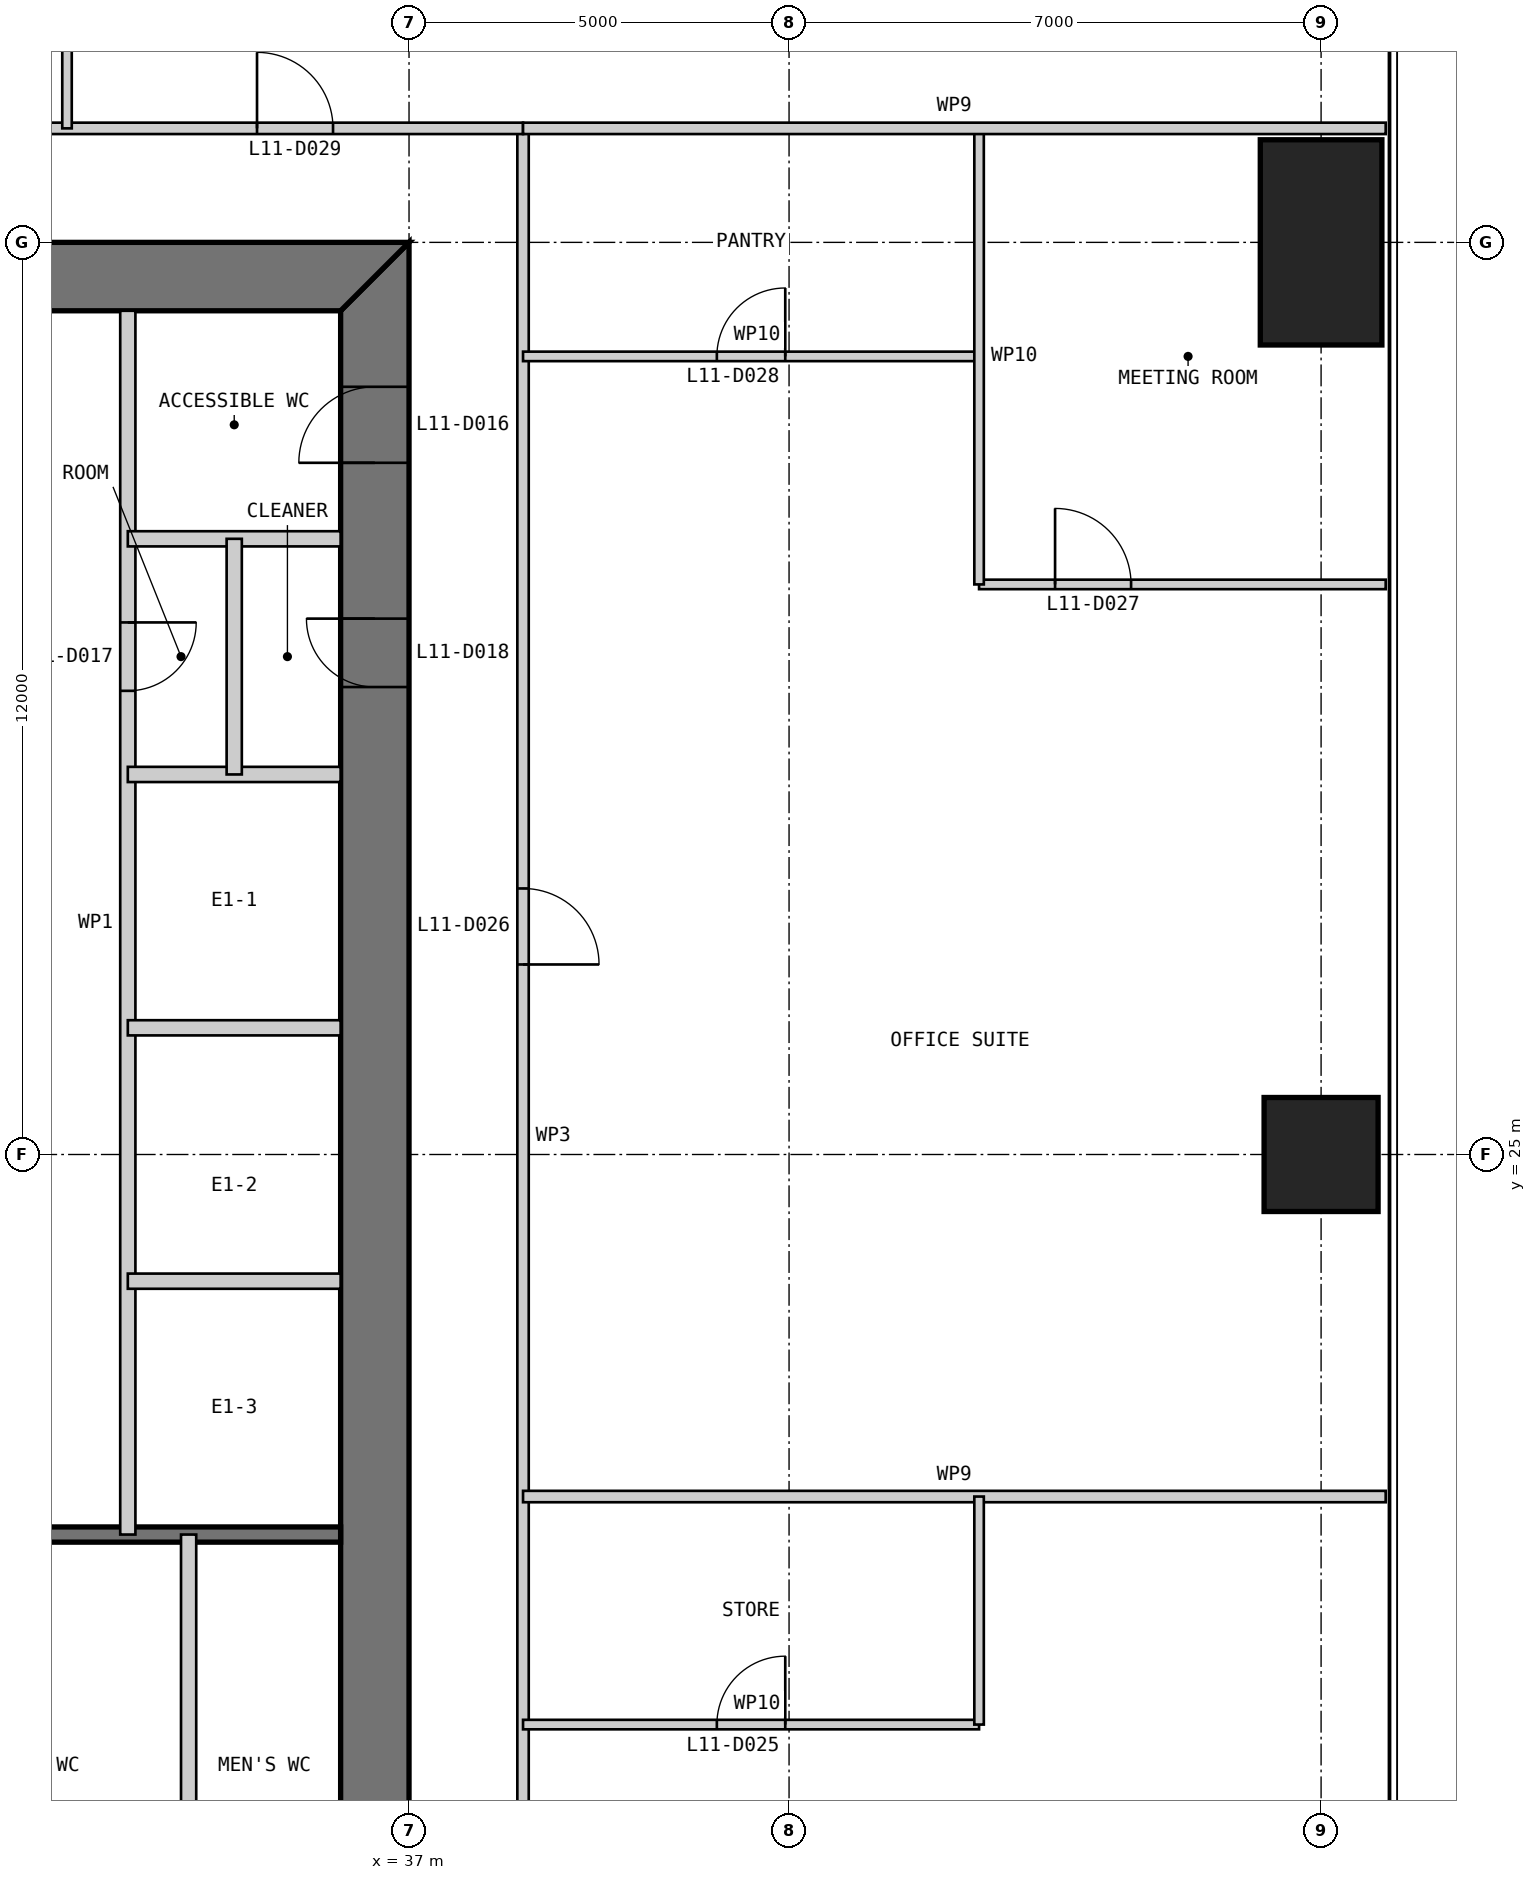
"""IFC4 building model, lengths in metres.
Left out: names, types, materials, properties, quantities, classifications, styles, units other than length and angle.
Written with IfcOpenShell. Run it as: python <this file> out.ifc"""

import sys

from ifc_helpers import new_model, si_unit, direction, frame, frame_2d, origin, origin_2d, place, context, subcontext, project, spatial, polyline, rectangle, outline, extrude, element, fill, save


model = new_model("IFC4")
c1 = context("Model", 3, precision=1e-05, world=origin(), true_north=direction((0.0, 1.0)))
c2 = subcontext(c1, "Body", "Model", "MODEL_VIEW")
j1 = project(units=[si_unit("LENGTHUNIT", "METRE"), si_unit("PLANEANGLEUNIT", "RADIAN")], contexts=[c1])
p1 = place(None, origin())
s1 = spatial("IfcSite", under=j1, at=p1, CompositionType="ELEMENT")
p2 = place(p1, origin())
s2 = spatial("IfcBuilding", under=s1, at=p2, CompositionType="ELEMENT")
p3 = place(p2, frame((0.0, 0.0, 51.0)))
s3 = spatial("IfcBuildingStorey", under=s2, at=p3, CompositionType="ELEMENT", Elevation=51.0)
p4 = place(p3, frame((49.0, 25.0, 0.0), z_axis=(0.0, 0.0, 1.0), x_axis=(1.0, 0.0, 0.0)))
e1 = element("IfcColumn", 1, at=p4, inside=s3, PredefinedType="COLUMN", context=c2, shape_type="SweptSolid", body=[
    extrude(rectangle(XDim=1.5, YDim=1.5, at=origin_2d()), origin(), (0.0, 0.0, 1.0), 4.0),
])
p5 = place(p3, frame((49.0, 37.0, 0.0), z_axis=(0.0, 0.0, 1.0), x_axis=(1.0, 0.0, 0.0)))
e2 = element("IfcColumn", 2, at=p5, inside=s3, PredefinedType="COLUMN", context=c2, shape_type="SweptSolid", body=[
    extrude(rectangle(XDim=1.6, YDim=2.7, at=origin_2d()), origin(), (0.0, 0.0, 1.0), 4.0),
])
p6 = place(p3, frame((36.55, 13.9, 0.0), z_axis=(0.0, 0.0, 1.0), x_axis=(0.0, 1.0, 0.0)))
e3 = element("IfcWall", 3, at=p6, inside=s3, PredefinedType="SHEAR", context=c2, shape_type="SweptSolid", body=[
    extrude(outline(polyline([(-0.9, -0.45), (23.1, -0.45), (22.2, 0.45), (0.0, 0.45), (-0.9, -0.45)])), origin(), (0.0, 0.0, 1.0), 4.0),
])
p7 = place(p6, frame((20.2, 0.0, 0.0)))
e4 = element("IfcOpeningElement", 4, at=p7, cuts=e3, PredefinedType="OPENING", context=c2, shape_type="SweptSolid", body=[
    extrude(rectangle(XDim=1.0, YDim=2.2, at=frame_2d((0.5, 1.1))), frame((0.0, 0.46, 0.0), z_axis=(0.0, -1.0, 0.0), x_axis=(1.0, 0.0, 0.0)), (0.0, 0.0, 1.0), 0.92),
])
p8 = place(p6, frame((17.25, 0.0, 0.0)))
e5 = element("IfcOpeningElement", 5, at=p8, cuts=e3, PredefinedType="OPENING", context=c2, shape_type="SweptSolid", body=[
    extrude(rectangle(XDim=0.9, YDim=2.2, at=frame_2d((0.45, 1.1))), frame((0.0, 0.46, 0.0), z_axis=(0.0, -1.0, 0.0), x_axis=(1.0, 0.0, 0.0)), (0.0, 0.0, 1.0), 0.92),
])
p9 = place(p3, frame((37.0, 36.55, 0.0), z_axis=(0.0, 0.0, 1.0), x_axis=(-1.0, 0.0, 0.0)))
e6 = element("IfcWall", 6, at=p9, inside=s3, PredefinedType="SHEAR", context=c2, shape_type="SweptSolid", body=[
    extrude(outline(polyline([(0.0, -0.45), (24.0, -0.45), (23.1, 0.45), (0.9, 0.45), (0.0, -0.45)])), origin(), (0.0, 0.0, 1.0), 4.0),
])
p10 = place(p9, frame((4.9, 0.0, 0.0)))
e7 = element("IfcOpeningElement", 7, at=p10, cuts=e6, PredefinedType="OPENING", context=c2, shape_type="SweptSolid", body=[
    extrude(rectangle(XDim=1.0, YDim=2.2, at=frame_2d((0.5, 1.1))), frame((0.0, 0.46, 0.0), z_axis=(0.0, -1.0, 0.0), x_axis=(1.0, 0.0, 0.0)), (0.0, 0.0, 1.0), 0.92),
])
p11 = place(p9, frame((8.9, 0.0, 0.0)))
e8 = element("IfcOpeningElement", 8, at=p11, cuts=e6, PredefinedType="OPENING", context=c2, shape_type="SweptSolid", body=[
    extrude(rectangle(XDim=1.1, YDim=2.2, at=frame_2d((0.55, 1.1))), frame((0.0, 0.46, 0.0), z_axis=(0.0, -1.0, 0.0), x_axis=(1.0, 0.0, 0.0)), (0.0, 0.0, 1.0), 0.92),
])
p12 = place(p9, frame((15.05, 0.0, 0.0)))
e9 = element("IfcOpeningElement", 9, at=p12, cuts=e6, PredefinedType="OPENING", context=c2, shape_type="SweptSolid", body=[
    extrude(rectangle(XDim=0.9, YDim=2.2, at=frame_2d((0.45, 1.1))), frame((0.0, 0.46, 0.0), z_axis=(0.0, -1.0, 0.0), x_axis=(1.0, 0.0, 0.0)), (0.0, 0.0, 1.0), 0.92),
])
p13 = place(p9, frame((17.9, 0.0, 0.0)))
e10 = element("IfcOpeningElement", 10, at=p13, cuts=e6, PredefinedType="OPENING", context=c2, shape_type="SweptSolid", body=[
    extrude(rectangle(XDim=1.0, YDim=2.2, at=frame_2d((0.5, 1.1))), frame((0.0, 0.46, 0.0), z_axis=(0.0, -1.0, 0.0), x_axis=(1.0, 0.0, 0.0)), (0.0, 0.0, 1.0), 0.92),
])
p14 = place(p9, frame((21.4, 0.0, 0.0)))
e11 = element("IfcOpeningElement", 11, at=p14, cuts=e6, PredefinedType="OPENING", context=c2, shape_type="SweptSolid", body=[
    extrude(rectangle(XDim=1.0, YDim=2.2, at=frame_2d((0.5, 1.1))), frame((0.0, 0.46, 0.0), z_axis=(0.0, -1.0, 0.0), x_axis=(1.0, 0.0, 0.0)), (0.0, 0.0, 1.0), 0.92),
])
p15 = place(p3, frame((20.3, 20.0, 0.0), z_axis=(0.0, 0.0, 1.0), x_axis=(1.0, 0.0, 0.0)))
e12 = element("IfcWall", 12, at=p15, inside=s3, PredefinedType="SOLIDWALL", context=c2, shape_type="SweptSolid", body=[
    extrude(rectangle(XDim=15.8, YDim=0.2, at=frame_2d((7.9, 0.0))), origin(), (0.0, 0.0, 1.0), 3.8),
])
p16 = place(p3, frame((34.1, 13.9, 0.0), z_axis=(0.0, 0.0, 1.0), x_axis=(0.0, 1.0, 0.0)))
e13 = element("IfcWall", 13, at=p16, inside=s3, PredefinedType="PARTITIONING", context=c2, shape_type="SweptSolid", body=[
    extrude(rectangle(XDim=6.1, YDim=0.2, at=frame_2d((3.05, 0.0))), origin(), (0.0, 0.0, 1.0), 3.8),
])
p17 = place(p3, frame((33.3, 36.1, 0.0), z_axis=(0.0, 0.0, 1.0), x_axis=(0.0, -1.0, 0.0)))
e14 = element("IfcWall", 14, at=p17, inside=s3, PredefinedType="PARTITIONING", context=c2, shape_type="SweptSolid", body=[
    extrude(rectangle(XDim=16.1, YDim=0.2, at=frame_2d((8.05, 0.0))), origin(), (0.0, 0.0, 1.0), 3.8),
])
p18 = place(p17, frame((4.1, 0.0, 0.0)))
e15 = element("IfcOpeningElement", 15, at=p18, cuts=e14, PredefinedType="OPENING", context=c2, shape_type="SweptSolid", body=[
    extrude(rectangle(XDim=0.9, YDim=2.2, at=frame_2d((0.45, 1.1))), frame((0.0, 0.11, 0.0), z_axis=(0.0, -1.0, 0.0), x_axis=(1.0, 0.0, 0.0)), (0.0, 0.0, 1.0), 0.22),
])
for number, where, z_axis, x_axis in (
    (16, (36.1, 30.0, 0.0), (0.0, 0.0, 1.0), (-1.0, 0.0, 0.0)),
    (17, (36.1, 26.667, 0.0), (0.0, 0.0, 1.0), (-1.0, 0.0, 0.0)),
    (18, (36.1, 23.333, 0.0), (0.0, 0.0, 1.0), (-1.0, 0.0, 0.0)),
    (19, (36.1, 33.1, 0.0), (0.0, 0.0, 1.0), (-1.0, 0.0, 0.0)),
):
    element("IfcWall", number, at=place(p3, frame(where, z_axis=z_axis, x_axis=x_axis)), inside=s3, PredefinedType="PARTITIONING", context=c2, shape_type="SweptSolid", body=[
        extrude(rectangle(XDim=2.8, YDim=0.2, at=frame_2d((1.4, 0.0))), origin(), (0.0, 0.0, 1.0), 3.8),
    ])
p19 = place(p3, frame((34.7, 33.1, 0.0), z_axis=(0.0, 0.0, 1.0), x_axis=(0.0, -1.0, 0.0)))
e20 = element("IfcWall", 20, at=p19, inside=s3, PredefinedType="PARTITIONING", context=c2, shape_type="SweptSolid", body=[
    extrude(rectangle(XDim=3.1, YDim=0.2, at=frame_2d((1.55, 0.0))), origin(), (0.0, 0.0, 1.0), 3.8),
])
p20 = place(p3, frame((38.5, 11.5, 0.0), z_axis=(0.0, 0.0, 1.0), x_axis=(0.0, 1.0, 0.0)))
e21 = element("IfcWall", 21, at=p20, inside=s3, PredefinedType="PARTITIONING", context=c2, shape_type="SweptSolid", body=[
    extrude(rectangle(XDim=27.0, YDim=0.15, at=frame_2d((13.5, 0.0))), origin(), (0.0, 0.0, 1.0), 3.85),
])
p21 = place(p20, frame((2.5, 0.0, 0.0)))
e22 = element("IfcOpeningElement", 22, at=p21, cuts=e21, PredefinedType="OPENING", context=c2, shape_type="SweptSolid", body=[
    extrude(rectangle(XDim=1.0, YDim=2.2, at=frame_2d((0.5, 1.1))), frame((0.0, 0.085, 0.0), z_axis=(0.0, -1.0, 0.0), x_axis=(1.0, 0.0, 0.0)), (0.0, 0.0, 1.0), 0.17),
])
p22 = place(p20, frame((16.0, 0.0, 0.0)))
e23 = element("IfcOpeningElement", 23, at=p22, cuts=e21, PredefinedType="OPENING", context=c2, shape_type="SweptSolid", body=[
    extrude(rectangle(XDim=1.0, YDim=2.2, at=frame_2d((0.5, 1.1))), frame((0.0, 0.085, 0.0), z_axis=(0.0, -1.0, 0.0), x_axis=(1.0, 0.0, 0.0)), (0.0, 0.0, 1.0), 0.17),
])
p23 = place(p3, frame((44.5, 17.5, 0.0), z_axis=(0.0, 0.0, 1.0), x_axis=(-1.0, 0.0, 0.0)))
e24 = element("IfcWall", 24, at=p23, inside=s3, PredefinedType="PARTITIONING", context=c2, shape_type="SweptSolid", body=[
    extrude(rectangle(XDim=6.0, YDim=0.125, at=frame_2d((3.0, 0.0))), origin(), (0.0, 0.0, 1.0), 3.85),
])
p24 = place(p23, frame((2.55, 0.0, 0.0)))
e25 = element("IfcOpeningElement", 25, at=p24, cuts=e24, PredefinedType="OPENING", context=c2, shape_type="SweptSolid", body=[
    extrude(rectangle(XDim=0.9, YDim=2.2, at=frame_2d((0.45, 1.1))), frame((0.0, 0.073, 0.0), z_axis=(0.0, -1.0, 0.0), x_axis=(1.0, 0.0, 0.0)), (0.0, 0.0, 1.0), 0.145),
])
p25 = place(p3, frame((49.85, 20.5, 0.0), z_axis=(0.0, 0.0, 1.0), x_axis=(-1.0, 0.0, 0.0)))
e26 = element("IfcWall", 26, at=p25, inside=s3, PredefinedType="PARTITIONING", context=c2, shape_type="SweptSolid", body=[
    extrude(rectangle(XDim=11.35, YDim=0.15, at=frame_2d((5.675, 0.0))), origin(), (0.0, 0.0, 1.0), 3.85),
])
p26 = place(p3, frame((49.85, 32.5, 0.0), z_axis=(0.0, 0.0, 1.0), x_axis=(-1.0, 0.0, 0.0)))
e27 = element("IfcWall", 27, at=p26, inside=s3, PredefinedType="PARTITIONING", context=c2, shape_type="SweptSolid", body=[
    extrude(rectangle(XDim=5.35, YDim=0.125, at=frame_2d((2.675, 0.0))), origin(), (0.0, 0.0, 1.0), 3.85),
])
p27 = place(p26, frame((3.35, 0.0, 0.0)))
e28 = element("IfcOpeningElement", 28, at=p27, cuts=e27, PredefinedType="OPENING", context=c2, shape_type="SweptSolid", body=[
    extrude(rectangle(XDim=1.0, YDim=2.2, at=frame_2d((0.5, 1.1))), frame((0.0, 0.073, 0.0), z_axis=(0.0, -1.0, 0.0), x_axis=(1.0, 0.0, 0.0)), (0.0, 0.0, 1.0), 0.145),
])
p28 = place(p3, frame((44.5, 35.5, 0.0), z_axis=(0.0, 0.0, 1.0), x_axis=(-1.0, 0.0, 0.0)))
e29 = element("IfcWall", 29, at=p28, inside=s3, PredefinedType="PARTITIONING", context=c2, shape_type="SweptSolid", body=[
    extrude(rectangle(XDim=6.0, YDim=0.125, at=frame_2d((3.0, 0.0))), origin(), (0.0, 0.0, 1.0), 3.85),
])
p29 = place(p28, frame((2.55, 0.0, 0.0)))
e30 = element("IfcOpeningElement", 30, at=p29, cuts=e29, PredefinedType="OPENING", context=c2, shape_type="SweptSolid", body=[
    extrude(rectangle(XDim=0.9, YDim=2.2, at=frame_2d((0.45, 1.1))), frame((0.0, 0.073, 0.0), z_axis=(0.0, -1.0, 0.0), x_axis=(1.0, 0.0, 0.0)), (0.0, 0.0, 1.0), 0.145),
])
p30 = place(p3, frame((44.5, 17.5, 0.0), z_axis=(0.0, 0.0, 1.0), x_axis=(0.0, 1.0, 0.0)))
e31 = element("IfcWall", 31, at=p30, inside=s3, PredefinedType="PARTITIONING", context=c2, shape_type="SweptSolid", body=[
    extrude(rectangle(XDim=3.0, YDim=0.125, at=frame_2d((1.5, 0.0))), origin(), (0.0, 0.0, 1.0), 3.85),
])
p31 = place(p3, frame((44.5, 32.5, 0.0), z_axis=(0.0, 0.0, 1.0), x_axis=(0.0, 1.0, 0.0)))
e32 = element("IfcWall", 32, at=p31, inside=s3, PredefinedType="PARTITIONING", context=c2, shape_type="SweptSolid", body=[
    extrude(rectangle(XDim=6.0, YDim=0.125, at=frame_2d((3.0, 0.0))), origin(), (0.0, 0.0, 1.0), 3.85),
])
p32 = place(p3, frame((38.5, 38.5, 0.0), z_axis=(0.0, 0.0, 1.0), x_axis=(-1.0, 0.0, 0.0)))
e33 = element("IfcWall", 33, at=p32, inside=s3, PredefinedType="PARTITIONING", context=c2, shape_type="SweptSolid", body=[
    extrude(rectangle(XDim=27.0, YDim=0.15, at=frame_2d((13.5, 0.0))), origin(), (0.0, 0.0, 1.0), 3.85),
])
p33 = place(p32, frame((2.5, 0.0, 0.0)))
e34 = element("IfcOpeningElement", 34, at=p33, cuts=e33, PredefinedType="OPENING", context=c2, shape_type="SweptSolid", body=[
    extrude(rectangle(XDim=1.0, YDim=2.2, at=frame_2d((0.5, 1.1))), frame((0.0, 0.085, 0.0), z_axis=(0.0, -1.0, 0.0), x_axis=(1.0, 0.0, 0.0)), (0.0, 0.0, 1.0), 0.17),
])
p34 = place(p32, frame((16.0, 0.0, 0.0)))
e35 = element("IfcOpeningElement", 35, at=p34, cuts=e33, PredefinedType="OPENING", context=c2, shape_type="SweptSolid", body=[
    extrude(rectangle(XDim=1.0, YDim=2.2, at=frame_2d((0.5, 1.1))), frame((0.0, 0.085, 0.0), z_axis=(0.0, -1.0, 0.0), x_axis=(1.0, 0.0, 0.0)), (0.0, 0.0, 1.0), 0.17),
])
p35 = place(p3, frame((49.85, 38.5, 0.0), z_axis=(0.0, 0.0, 1.0), x_axis=(-1.0, 0.0, 0.0)))
e36 = element("IfcWall", 36, at=p35, inside=s3, PredefinedType="PARTITIONING", context=c2, shape_type="SweptSolid", body=[
    extrude(rectangle(XDim=11.35, YDim=0.15, at=frame_2d((5.675, 0.0))), origin(), (0.0, 0.0, 1.0), 3.85),
])
p36 = place(p3, frame((32.5, 44.5, 0.0), z_axis=(0.0, 0.0, 1.0), x_axis=(0.0, -1.0, 0.0)))
e37 = element("IfcWall", 37, at=p36, inside=s3, PredefinedType="PARTITIONING", context=c2, shape_type="SweptSolid", body=[
    extrude(rectangle(XDim=6.0, YDim=0.125, at=frame_2d((3.0, 0.0))), origin(), (0.0, 0.0, 1.0), 3.85),
])
p37 = place(p36, frame((2.55, 0.0, 0.0)))
e38 = element("IfcOpeningElement", 38, at=p37, cuts=e37, PredefinedType="OPENING", context=c2, shape_type="SweptSolid", body=[
    extrude(rectangle(XDim=0.9, YDim=2.2, at=frame_2d((0.45, 1.1))), frame((0.0, 0.073, 0.0), z_axis=(0.0, -1.0, 0.0), x_axis=(1.0, 0.0, 0.0)), (0.0, 0.0, 1.0), 0.145),
])
p38 = place(p7, origin())
e39 = element("IfcDoor", 39, at=p38, inside=s3, OperationType="SINGLE_SWING_LEFT", PredefinedType="DOOR", context=c2, shape_type="SweptSolid", body=[
    extrude(rectangle(XDim=1.0, YDim=2.2, at=frame_2d((0.5, 1.1))), frame((0.0, 0.025, 0.0), z_axis=(0.0, -1.0, 0.0), x_axis=(1.0, 0.0, 0.0)), (0.0, 0.0, 1.0), 0.05),
    extrude(outline(polyline([(0.0, 0.0), (0.04, 0.0), (0.04, 2.16), (0.96, 2.16), (0.96, 0.0), (1.0, 0.0), (1.0, 2.2), (0.0, 2.2), (0.0, 0.0)])), frame((0.0, 0.3, 0.0), z_axis=(0.0, -1.0, 0.0), x_axis=(1.0, 0.0, 0.0)), (0.0, 0.0, 1.0), 0.6),
])
fill(e4, e39)
p39 = place(p18, origin())
e40 = element("IfcDoor", 40, at=p39, inside=s3, OperationType="SINGLE_SWING_LEFT", PredefinedType="DOOR", context=c2, shape_type="SweptSolid", body=[
    extrude(rectangle(XDim=0.9, YDim=2.2, at=frame_2d((0.45, 1.1))), frame((0.0, 0.025, 0.0), z_axis=(0.0, -1.0, 0.0), x_axis=(1.0, 0.0, 0.0)), (0.0, 0.0, 1.0), 0.05),
])
fill(e15, e40)
p40 = place(p8, origin())
e41 = element("IfcDoor", 41, at=p40, inside=s3, OperationType="SINGLE_SWING_RIGHT", PredefinedType="DOOR", context=c2, shape_type="SweptSolid", body=[
    extrude(rectangle(XDim=0.9, YDim=2.2, at=frame_2d((0.45, 1.1))), frame((0.0, 0.025, 0.0), z_axis=(0.0, -1.0, 0.0), x_axis=(1.0, 0.0, 0.0)), (0.0, 0.0, 1.0), 0.05),
    extrude(outline(polyline([(0.0, 0.0), (0.04, 0.0), (0.04, 2.16), (0.86, 2.16), (0.86, 0.0), (0.9, 0.0), (0.9, 2.2), (0.0, 2.2), (0.0, 0.0)])), frame((0.0, 0.3, 0.0), z_axis=(0.0, -1.0, 0.0), x_axis=(1.0, 0.0, 0.0)), (0.0, 0.0, 1.0), 0.6),
])
fill(e5, e41)
p41 = place(p24, frame((0.9, 0.0, 0.0), z_axis=(0.0, 0.0, 1.0), x_axis=(-1.0, 0.0, 0.0)))
e42 = element("IfcDoor", 42, at=p41, inside=s3, OperationType="SINGLE_SWING_RIGHT", PredefinedType="DOOR", context=c2, shape_type="SweptSolid", body=[
    extrude(rectangle(XDim=0.9, YDim=2.2, at=frame_2d((0.45, 1.1))), frame((0.0, 0.025, 0.0), z_axis=(0.0, -1.0, 0.0), x_axis=(1.0, 0.0, 0.0)), (0.0, 0.0, 1.0), 0.05),
])
fill(e25, e42)
p42 = place(p22, frame((1.0, 0.0, 0.0), z_axis=(0.0, 0.0, 1.0), x_axis=(-1.0, 0.0, 0.0)))
e43 = element("IfcDoor", 43, at=p42, inside=s3, OperationType="SINGLE_SWING_RIGHT", PredefinedType="DOOR", context=c2, shape_type="SweptSolid", body=[
    extrude(rectangle(XDim=1.0, YDim=2.2, at=frame_2d((0.5, 1.1))), frame((0.0, 0.025, 0.0), z_axis=(0.0, -1.0, 0.0), x_axis=(1.0, 0.0, 0.0)), (0.0, 0.0, 1.0), 0.05),
])
fill(e23, e43)
p43 = place(p27, frame((1.0, 0.0, 0.0), z_axis=(0.0, 0.0, 1.0), x_axis=(-1.0, 0.0, 0.0)))
e44 = element("IfcDoor", 44, at=p43, inside=s3, OperationType="SINGLE_SWING_LEFT", PredefinedType="DOOR", context=c2, shape_type="SweptSolid", body=[
    extrude(rectangle(XDim=1.0, YDim=2.2, at=frame_2d((0.5, 1.1))), frame((0.0, 0.025, 0.0), z_axis=(0.0, -1.0, 0.0), x_axis=(1.0, 0.0, 0.0)), (0.0, 0.0, 1.0), 0.05),
])
fill(e28, e44)
p44 = place(p29, frame((0.9, 0.0, 0.0), z_axis=(0.0, 0.0, 1.0), x_axis=(-1.0, 0.0, 0.0)))
e45 = element("IfcDoor", 45, at=p44, inside=s3, OperationType="SINGLE_SWING_RIGHT", PredefinedType="DOOR", context=c2, shape_type="SweptSolid", body=[
    extrude(rectangle(XDim=0.9, YDim=2.2, at=frame_2d((0.45, 1.1))), frame((0.0, 0.025, 0.0), z_axis=(0.0, -1.0, 0.0), x_axis=(1.0, 0.0, 0.0)), (0.0, 0.0, 1.0), 0.05),
])
fill(e30, e45)
p45 = place(p33, frame((1.0, 0.0, 0.0), z_axis=(0.0, 0.0, 1.0), x_axis=(-1.0, 0.0, 0.0)))
e46 = element("IfcDoor", 46, at=p45, inside=s3, OperationType="SINGLE_SWING_LEFT", PredefinedType="DOOR", context=c2, shape_type="SweptSolid", body=[
    extrude(rectangle(XDim=1.0, YDim=2.2, at=frame_2d((0.5, 1.1))), frame((0.0, 0.025, 0.0), z_axis=(0.0, -1.0, 0.0), x_axis=(1.0, 0.0, 0.0)), (0.0, 0.0, 1.0), 0.05),
])
fill(e34, e46)
save(model, sys.argv[1])
